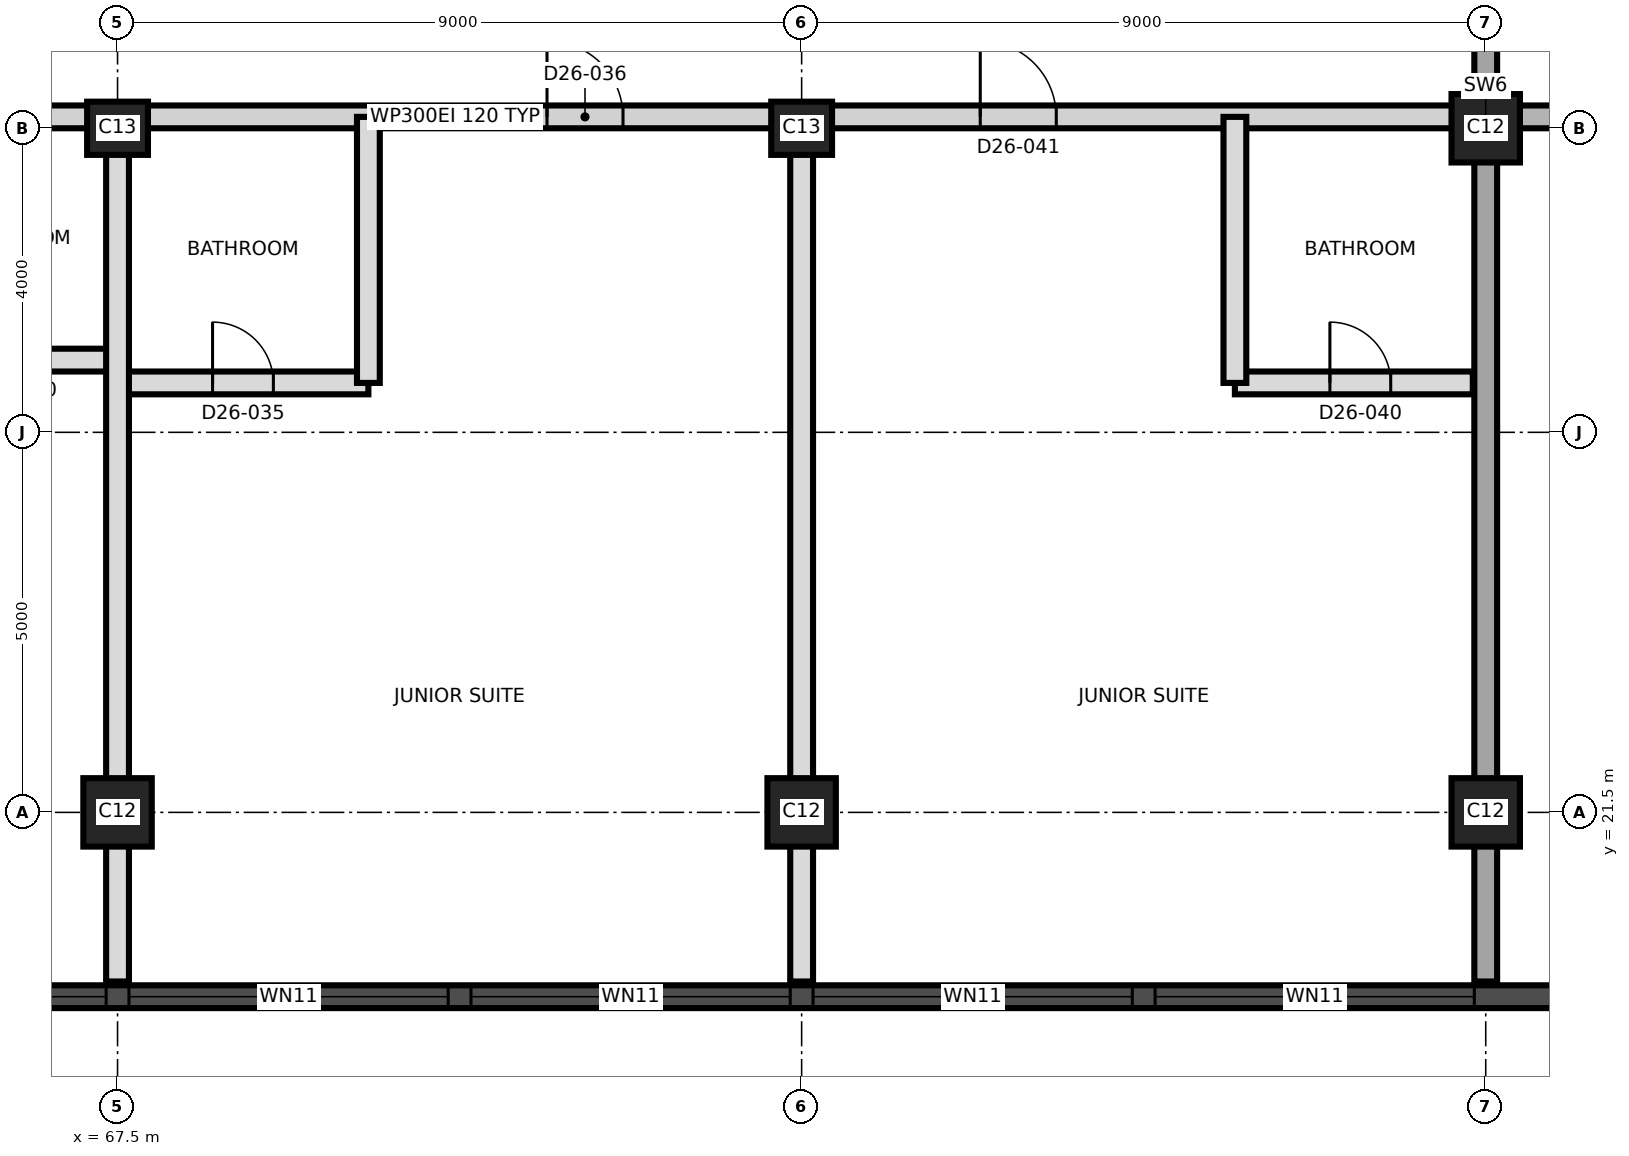
"""IFC4 building model, lengths in metres.
Left out: names, types, materials, properties, quantities, classifications, styles, units other than length and angle.
Written with IfcOpenShell. Run it as: python <this file> out.ifc"""

import sys

from ifc_helpers import new_model, si_unit, direction, frame, frame_2d, origin, origin_2d, place, context, subcontext, project, spatial, rectangle, extrude, element, fill, save


model = new_model("IFC4")
c1 = context("Model", 3, precision=1e-05, world=origin(), true_north=direction((0.0, 1.0)))
c2 = subcontext(c1, "Body", "Model", "MODEL_VIEW")
j1 = project(units=[si_unit("LENGTHUNIT", "METRE"), si_unit("PLANEANGLEUNIT", "RADIAN")], contexts=[c1])
p1 = place(None, origin())
s1 = spatial("IfcSite", under=j1, at=p1, CompositionType="ELEMENT")
p2 = place(p1, origin())
s2 = spatial("IfcBuilding", under=s1, at=p2, CompositionType="ELEMENT")
p3 = place(p2, frame((0.0, 0.0, 232.8)))
s3 = spatial("IfcBuildingStorey", under=s2, at=p3, CompositionType="ELEMENT", Elevation=232.8)
for number, where, z_axis, x_axis in (
    (1, (67.5, 21.5, 0.0), (0.0, 0.0, 1.0), (1.0, 0.0, 0.0)),
    (2, (76.5, 21.5, 0.0), (0.0, 0.0, 1.0), (1.0, 0.0, 0.0)),
    (3, (85.5, 21.5, 0.0), (0.0, 0.0, 1.0), (1.0, 0.0, 0.0)),
):
    element("IfcColumn", number, at=place(p3, frame(where, z_axis=z_axis, x_axis=x_axis)), inside=s3, PredefinedType="COLUMN", context=c2, shape_type="SweptSolid", body=[
        extrude(rectangle(XDim=0.9, YDim=0.9, at=origin_2d()), origin(), (0.0, 0.0, 1.0), 3.7),
    ])
for number, where, z_axis, x_axis in (
    (4, (67.5, 30.5, 0.0), (0.0, 0.0, 1.0), (1.0, 0.0, 0.0)),
    (5, (76.5, 30.5, 0.0), (0.0, 0.0, 1.0), (1.0, 0.0, 0.0)),
):
    element("IfcColumn", number, at=place(p3, frame(where, z_axis=z_axis, x_axis=x_axis)), inside=s3, PredefinedType="COLUMN", context=c2, shape_type="SweptSolid", body=[
        extrude(rectangle(XDim=0.8, YDim=0.7, at=origin_2d()), origin(), (0.0, 0.0, 1.0), 3.7),
    ])
p4 = place(p3, frame((85.5, 30.5, 0.0), z_axis=(0.0, 0.0, 1.0), x_axis=(1.0, 0.0, 0.0)))
e6 = element("IfcColumn", 6, at=p4, inside=s3, PredefinedType="COLUMN", context=c2, shape_type="SweptSolid", body=[
    extrude(rectangle(XDim=0.9, YDim=0.9, at=origin_2d()), origin(), (0.0, 0.0, 1.0), 3.7),
])
p5 = place(p3, frame((85.5, 19.275, 0.0), z_axis=(0.0, 0.0, 1.0), x_axis=(0.0, 1.0, 0.0)))
e7 = element("IfcWall", 7, at=p5, inside=s3, PredefinedType="SHEAR", context=c2, shape_type="SweptSolid", body=[
    extrude(rectangle(XDim=22.45, YDim=0.3, at=frame_2d((11.225, 0.0))), origin(), (0.0, 0.0, 1.0), 3.7),
])
p6 = place(p5, frame((12.425, 0.0, 0.0)))
e8 = element("IfcOpeningElement", 8, at=p6, cuts=e7, PredefinedType="OPENING", context=c2, shape_type="SweptSolid", body=[
    extrude(rectangle(XDim=1.4, YDim=2.1, at=frame_2d((0.7, 1.05))), frame((0.0, 0.16, 0.0), z_axis=(0.0, -1.0, 0.0), x_axis=(1.0, 0.0, 0.0)), (0.0, 0.0, 1.0), 0.32),
])
p7 = place(p3, frame((44.01, 19.075, 0.0), z_axis=(0.0, 0.0, 1.0), x_axis=(1.0, 0.0, 0.0)))
e9 = element("IfcWall", 9, at=p7, inside=s3, PredefinedType="SOLIDWALL", context=c2, shape_type="SweptSolid", body=[
    extrude(rectangle(XDim=43.478, YDim=0.3, at=frame_2d((21.739, 0.0))), origin(), (0.0, 0.0, 1.0), 3.4),
])
p8 = place(p7, frame((1.845, 0.0, 0.3)))
e10 = element("IfcOpeningElement", 10, at=p8, cuts=e9, PredefinedType="OPENING", context=c2, shape_type="SweptSolid", body=[
    extrude(rectangle(XDim=1.8, YDim=2.4, at=frame_2d((0.9, 1.2))), frame((0.0, 0.16, 0.0), z_axis=(0.0, -1.0, 0.0), x_axis=(1.0, 0.0, 0.0)), (0.0, 0.0, 1.0), 0.32),
])
p9 = place(p7, frame((5.64, 0.0, 0.9)))
e11 = element("IfcOpeningElement", 11, at=p9, cuts=e9, PredefinedType="OPENING", context=c2, shape_type="SweptSolid", body=[
    extrude(rectangle(XDim=4.2, YDim=1.5, at=frame_2d((2.1, 0.75))), frame((0.0, 0.16, 0.0), z_axis=(0.0, -1.0, 0.0), x_axis=(1.0, 0.0, 0.0)), (0.0, 0.0, 1.0), 0.32),
])
p10 = place(p7, frame((10.14, 0.0, 0.9)))
e12 = element("IfcOpeningElement", 12, at=p10, cuts=e9, PredefinedType="OPENING", context=c2, shape_type="SweptSolid", body=[
    extrude(rectangle(XDim=4.2, YDim=1.5, at=frame_2d((2.1, 0.75))), frame((0.0, 0.16, 0.0), z_axis=(0.0, -1.0, 0.0), x_axis=(1.0, 0.0, 0.0)), (0.0, 0.0, 1.0), 0.32),
])
p11 = place(p7, frame((14.64, 0.0, 0.9)))
e13 = element("IfcOpeningElement", 13, at=p11, cuts=e9, PredefinedType="OPENING", context=c2, shape_type="SweptSolid", body=[
    extrude(rectangle(XDim=4.2, YDim=1.5, at=frame_2d((2.1, 0.75))), frame((0.0, 0.16, 0.0), z_axis=(0.0, -1.0, 0.0), x_axis=(1.0, 0.0, 0.0)), (0.0, 0.0, 1.0), 0.32),
])
p12 = place(p7, frame((19.14, 0.0, 0.9)))
e14 = element("IfcOpeningElement", 14, at=p12, cuts=e9, PredefinedType="OPENING", context=c2, shape_type="SweptSolid", body=[
    extrude(rectangle(XDim=4.2, YDim=1.5, at=frame_2d((2.1, 0.75))), frame((0.0, 0.16, 0.0), z_axis=(0.0, -1.0, 0.0), x_axis=(1.0, 0.0, 0.0)), (0.0, 0.0, 1.0), 0.32),
])
p13 = place(p7, frame((23.64, 0.0, 0.9)))
e15 = element("IfcOpeningElement", 15, at=p13, cuts=e9, PredefinedType="OPENING", context=c2, shape_type="SweptSolid", body=[
    extrude(rectangle(XDim=4.2, YDim=1.5, at=frame_2d((2.1, 0.75))), frame((0.0, 0.16, 0.0), z_axis=(0.0, -1.0, 0.0), x_axis=(1.0, 0.0, 0.0)), (0.0, 0.0, 1.0), 0.32),
])
p14 = place(p7, frame((28.14, 0.0, 0.9)))
e16 = element("IfcOpeningElement", 16, at=p14, cuts=e9, PredefinedType="OPENING", context=c2, shape_type="SweptSolid", body=[
    extrude(rectangle(XDim=4.2, YDim=1.5, at=frame_2d((2.1, 0.75))), frame((0.0, 0.16, 0.0), z_axis=(0.0, -1.0, 0.0), x_axis=(1.0, 0.0, 0.0)), (0.0, 0.0, 1.0), 0.32),
])
p15 = place(p7, frame((32.64, 0.0, 0.9)))
e17 = element("IfcOpeningElement", 17, at=p15, cuts=e9, PredefinedType="OPENING", context=c2, shape_type="SweptSolid", body=[
    extrude(rectangle(XDim=4.2, YDim=1.5, at=frame_2d((2.1, 0.75))), frame((0.0, 0.16, 0.0), z_axis=(0.0, -1.0, 0.0), x_axis=(1.0, 0.0, 0.0)), (0.0, 0.0, 1.0), 0.32),
])
p16 = place(p7, frame((37.14, 0.0, 0.9)))
e18 = element("IfcOpeningElement", 18, at=p16, cuts=e9, PredefinedType="OPENING", context=c2, shape_type="SweptSolid", body=[
    extrude(rectangle(XDim=4.2, YDim=1.5, at=frame_2d((2.1, 0.75))), frame((0.0, 0.16, 0.0), z_axis=(0.0, -1.0, 0.0), x_axis=(1.0, 0.0, 0.0)), (0.0, 0.0, 1.0), 0.32),
])
p17 = place(p3, frame((67.5, 27.15, 0.0), z_axis=(0.0, 0.0, 1.0), x_axis=(1.0, 0.0, 0.0)))
e19 = element("IfcWall", 19, at=p17, inside=s3, PredefinedType="PARTITIONING", context=c2, shape_type="SweptSolid", body=[
    extrude(rectangle(XDim=3.3, YDim=0.3, at=frame_2d((1.65, 0.0))), origin(), (0.0, 0.0, 1.0), 3.4),
])
p18 = place(p17, frame((1.25, 0.0, 0.0)))
e20 = element("IfcOpeningElement", 20, at=p18, cuts=e19, PredefinedType="OPENING", context=c2, shape_type="SweptSolid", body=[
    extrude(rectangle(XDim=0.8, YDim=2.1, at=frame_2d((0.4, 1.05))), frame((0.0, 0.16, 0.0), z_axis=(0.0, -1.0, 0.0), x_axis=(1.0, 0.0, 0.0)), (0.0, 0.0, 1.0), 0.32),
])
p19 = place(p3, frame((82.2, 27.15, 0.0), z_axis=(0.0, 0.0, 1.0), x_axis=(1.0, 0.0, 0.0)))
e21 = element("IfcWall", 21, at=p19, inside=s3, PredefinedType="PARTITIONING", context=c2, shape_type="SweptSolid", body=[
    extrude(rectangle(XDim=3.13, YDim=0.3, at=frame_2d((1.565, 0.0))), origin(), (0.0, 0.0, 1.0), 3.4),
])
p20 = place(p19, frame((1.25, 0.0, 0.0)))
e22 = element("IfcOpeningElement", 22, at=p20, cuts=e21, PredefinedType="OPENING", context=c2, shape_type="SweptSolid", body=[
    extrude(rectangle(XDim=0.8, YDim=2.1, at=frame_2d((0.4, 1.05))), frame((0.0, 0.16, 0.0), z_axis=(0.0, -1.0, 0.0), x_axis=(1.0, 0.0, 0.0)), (0.0, 0.0, 1.0), 0.32),
])
p21 = place(p3, frame((64.8, 27.45, 0.0), z_axis=(0.0, 0.0, 1.0), x_axis=(1.0, 0.0, 0.0)))
e23 = element("IfcWall", 23, at=p21, inside=s3, PredefinedType="PARTITIONING", context=c2, shape_type="SweptSolid", body=[
    extrude(rectangle(XDim=2.7, YDim=0.3, at=frame_2d((1.35, 0.0))), origin(), (0.0, 0.0, 1.0), 3.4),
])
p22 = place(p21, frame((0.95, 0.0, 0.0)))
e24 = element("IfcOpeningElement", 24, at=p22, cuts=e23, PredefinedType="OPENING", context=c2, shape_type="SweptSolid", body=[
    extrude(rectangle(XDim=0.8, YDim=2.1, at=frame_2d((0.4, 1.05))), frame((0.0, 0.16, 0.0), z_axis=(0.0, -1.0, 0.0), x_axis=(1.0, 0.0, 0.0)), (0.0, 0.0, 1.0), 0.32),
])
p23 = place(p3, frame((58.55, 30.65, 0.0), z_axis=(0.0, 0.0, 1.0), x_axis=(1.0, 0.0, 0.0)))
e25 = element("IfcWall", 25, at=p23, inside=s3, PredefinedType="PARTITIONING", context=c2, shape_type="SweptSolid", body=[
    extrude(rectangle(XDim=26.78, YDim=0.3, at=frame_2d((13.39, 0.0))), origin(), (0.0, 0.0, 1.0), 3.4),
])
p24 = place(p23, frame((1.085, 0.0, 0.0)))
e26 = element("IfcOpeningElement", 26, at=p24, cuts=e25, PredefinedType="OPENING", context=c2, shape_type="SweptSolid", body=[
    extrude(rectangle(XDim=1.2, YDim=2.1, at=frame_2d((0.6, 1.05))), frame((0.0, 0.16, 0.0), z_axis=(0.0, -1.0, 0.0), x_axis=(1.0, 0.0, 0.0)), (0.0, 0.0, 1.0), 0.32),
])
p25 = place(p23, frame((4.335, 0.0, 0.0)))
e27 = element("IfcOpeningElement", 27, at=p25, cuts=e25, PredefinedType="OPENING", context=c2, shape_type="SweptSolid", body=[
    extrude(rectangle(XDim=1.0, YDim=2.1, at=frame_2d((0.5, 1.05))), frame((0.0, 0.16, 0.0), z_axis=(0.0, -1.0, 0.0), x_axis=(1.0, 0.0, 0.0)), (0.0, 0.0, 1.0), 0.32),
])
p26 = place(p23, frame((14.6, 0.0, 0.0)))
e28 = element("IfcOpeningElement", 28, at=p26, cuts=e25, PredefinedType="OPENING", context=c2, shape_type="SweptSolid", body=[
    extrude(rectangle(XDim=1.0, YDim=2.4, at=frame_2d((0.5, 1.2))), frame((0.0, 0.16, 0.0), z_axis=(0.0, -1.0, 0.0), x_axis=(1.0, 0.0, 0.0)), (0.0, 0.0, 1.0), 0.32),
])
p27 = place(p23, frame((20.3, 0.0, 0.0)))
e29 = element("IfcOpeningElement", 29, at=p27, cuts=e25, PredefinedType="OPENING", context=c2, shape_type="SweptSolid", body=[
    extrude(rectangle(XDim=1.0, YDim=2.4, at=frame_2d((0.5, 1.2))), frame((0.0, 0.16, 0.0), z_axis=(0.0, -1.0, 0.0), x_axis=(1.0, 0.0, 0.0)), (0.0, 0.0, 1.0), 0.32),
])
p28 = place(p3, frame((85.67, 30.65, 0.0), z_axis=(0.0, 0.0, 1.0), x_axis=(1.0, 0.0, 0.0)))
e30 = element("IfcWall", 30, at=p28, inside=s3, PredefinedType="SHEAR", context=c2, shape_type="SweptSolid", body=[
    extrude(rectangle(XDim=9.58, YDim=0.3, at=frame_2d((4.79, 0.0))), origin(), (0.0, 0.0, 1.0), 3.4),
])
p29 = place(p28, frame((2.08, 0.0, 0.0)))
e31 = element("IfcOpeningElement", 31, at=p29, cuts=e30, PredefinedType="OPENING", context=c2, shape_type="SweptSolid", body=[
    extrude(rectangle(XDim=1.2, YDim=2.1, at=frame_2d((0.6, 1.05))), frame((0.0, 0.16, 0.0), z_axis=(0.0, -1.0, 0.0), x_axis=(1.0, 0.0, 0.0)), (0.0, 0.0, 1.0), 0.32),
])
p30 = place(p28, frame((5.63, 0.0, 0.0)))
e32 = element("IfcOpeningElement", 32, at=p30, cuts=e30, PredefinedType="OPENING", context=c2, shape_type="SweptSolid", body=[
    extrude(rectangle(XDim=1.0, YDim=2.1, at=frame_2d((0.5, 1.05))), frame((0.0, 0.16, 0.0), z_axis=(0.0, -1.0, 0.0), x_axis=(1.0, 0.0, 0.0)), (0.0, 0.0, 1.0), 0.32),
])
p31 = place(p3, frame((67.5, 19.275, 0.0), z_axis=(0.0, 0.0, 1.0), x_axis=(0.0, 1.0, 0.0)))
e33 = element("IfcWall", 33, at=p31, inside=s3, PredefinedType="PARTITIONING", context=c2, shape_type="SweptSolid", body=[
    extrude(rectangle(XDim=11.375, YDim=0.3, at=frame_2d((5.688, 0.0))), origin(), (0.0, 0.0, 1.0), 3.4),
])
p32 = place(p3, frame((70.8, 27.15, 0.0), z_axis=(0.0, 0.0, 1.0), x_axis=(0.0, 1.0, 0.0)))
e34 = element("IfcWall", 34, at=p32, inside=s3, PredefinedType="PARTITIONING", context=c2, shape_type="SweptSolid", body=[
    extrude(rectangle(XDim=3.5, YDim=0.3, at=frame_2d((1.75, 0.0))), origin(), (0.0, 0.0, 1.0), 3.4),
])
p33 = place(p3, frame((76.5, 19.275, 0.0), z_axis=(0.0, 0.0, 1.0), x_axis=(0.0, 1.0, 0.0)))
e35 = element("IfcWall", 35, at=p33, inside=s3, PredefinedType="PARTITIONING", context=c2, shape_type="SweptSolid", body=[
    extrude(rectangle(XDim=11.375, YDim=0.3, at=frame_2d((5.688, 0.0))), origin(), (0.0, 0.0, 1.0), 3.4),
])
p34 = place(p3, frame((82.2, 27.15, 0.0), z_axis=(0.0, 0.0, 1.0), x_axis=(0.0, 1.0, 0.0)))
e36 = element("IfcWall", 36, at=p34, inside=s3, PredefinedType="PARTITIONING", context=c2, shape_type="SweptSolid", body=[
    extrude(rectangle(XDim=3.5, YDim=0.3, at=frame_2d((1.75, 0.0))), origin(), (0.0, 0.0, 1.0), 3.4),
])
p35 = place(p12, origin())
e37 = element("IfcWindow", 37, at=p35, inside=s3, PartitioningType="SINGLE_PANEL", PredefinedType="WINDOW", context=c2, shape_type="SweptSolid", body=[
    extrude(rectangle(XDim=4.2, YDim=1.5, at=frame_2d((2.1, 0.75))), frame((0.0, 0.03, 0.0), z_axis=(0.0, -1.0, 0.0), x_axis=(1.0, 0.0, 0.0)), (0.0, 0.0, 1.0), 0.06),
])
fill(e14, e37)
p36 = place(p13, origin())
e38 = element("IfcWindow", 38, at=p36, inside=s3, PartitioningType="SINGLE_PANEL", PredefinedType="WINDOW", context=c2, shape_type="SweptSolid", body=[
    extrude(rectangle(XDim=4.2, YDim=1.5, at=frame_2d((2.1, 0.75))), frame((0.0, 0.03, 0.0), z_axis=(0.0, -1.0, 0.0), x_axis=(1.0, 0.0, 0.0)), (0.0, 0.0, 1.0), 0.06),
])
fill(e15, e38)
p37 = place(p14, origin())
e39 = element("IfcWindow", 39, at=p37, inside=s3, PartitioningType="SINGLE_PANEL", PredefinedType="WINDOW", context=c2, shape_type="SweptSolid", body=[
    extrude(rectangle(XDim=4.2, YDim=1.5, at=frame_2d((2.1, 0.75))), frame((0.0, 0.03, 0.0), z_axis=(0.0, -1.0, 0.0), x_axis=(1.0, 0.0, 0.0)), (0.0, 0.0, 1.0), 0.06),
])
fill(e16, e39)
p38 = place(p15, origin())
e40 = element("IfcWindow", 40, at=p38, inside=s3, PartitioningType="SINGLE_PANEL", PredefinedType="WINDOW", context=c2, shape_type="SweptSolid", body=[
    extrude(rectangle(XDim=4.2, YDim=1.5, at=frame_2d((2.1, 0.75))), frame((0.0, 0.03, 0.0), z_axis=(0.0, -1.0, 0.0), x_axis=(1.0, 0.0, 0.0)), (0.0, 0.0, 1.0), 0.06),
])
fill(e17, e40)
p39 = place(p16, origin())
e41 = element("IfcWindow", 41, at=p39, inside=s3, PartitioningType="SINGLE_PANEL", PredefinedType="WINDOW", context=c2, shape_type="SweptSolid", body=[
    extrude(rectangle(XDim=4.2, YDim=1.5, at=frame_2d((2.1, 0.75))), frame((0.0, 0.03, 0.0), z_axis=(0.0, -1.0, 0.0), x_axis=(1.0, 0.0, 0.0)), (0.0, 0.0, 1.0), 0.06),
])
fill(e18, e41)
p40 = place(p18, origin())
e42 = element("IfcDoor", 42, at=p40, inside=s3, OperationType="SINGLE_SWING_LEFT", PredefinedType="DOOR", context=c2, shape_type="SweptSolid", body=[
    extrude(rectangle(XDim=0.8, YDim=2.1, at=frame_2d((0.4, 1.05))), frame((0.0, 0.025, 0.0), z_axis=(0.0, -1.0, 0.0), x_axis=(1.0, 0.0, 0.0)), (0.0, 0.0, 1.0), 0.05),
])
fill(e20, e42)
p41 = place(p26, origin())
e43 = element("IfcDoor", 43, at=p41, inside=s3, OperationType="SINGLE_SWING_LEFT", PredefinedType="DOOR", context=c2, shape_type="SweptSolid", body=[
    extrude(rectangle(XDim=1.0, YDim=2.4, at=frame_2d((0.5, 1.2))), frame((0.0, 0.025, 0.0), z_axis=(0.0, -1.0, 0.0), x_axis=(1.0, 0.0, 0.0)), (0.0, 0.0, 1.0), 0.05),
])
fill(e28, e43)
p42 = place(p20, origin())
e44 = element("IfcDoor", 44, at=p42, inside=s3, OperationType="SINGLE_SWING_LEFT", PredefinedType="DOOR", context=c2, shape_type="SweptSolid", body=[
    extrude(rectangle(XDim=0.8, YDim=2.1, at=frame_2d((0.4, 1.05))), frame((0.0, 0.025, 0.0), z_axis=(0.0, -1.0, 0.0), x_axis=(1.0, 0.0, 0.0)), (0.0, 0.0, 1.0), 0.05),
])
fill(e22, e44)
p43 = place(p27, origin())
e45 = element("IfcDoor", 45, at=p43, inside=s3, OperationType="SINGLE_SWING_RIGHT", PredefinedType="DOOR", context=c2, shape_type="SweptSolid", body=[
    extrude(rectangle(XDim=1.0, YDim=2.4, at=frame_2d((0.5, 1.2))), frame((0.0, 0.025, 0.0), z_axis=(0.0, -1.0, 0.0), x_axis=(1.0, 0.0, 0.0)), (0.0, 0.0, 1.0), 0.05),
])
fill(e29, e45)
save(model, sys.argv[1])
